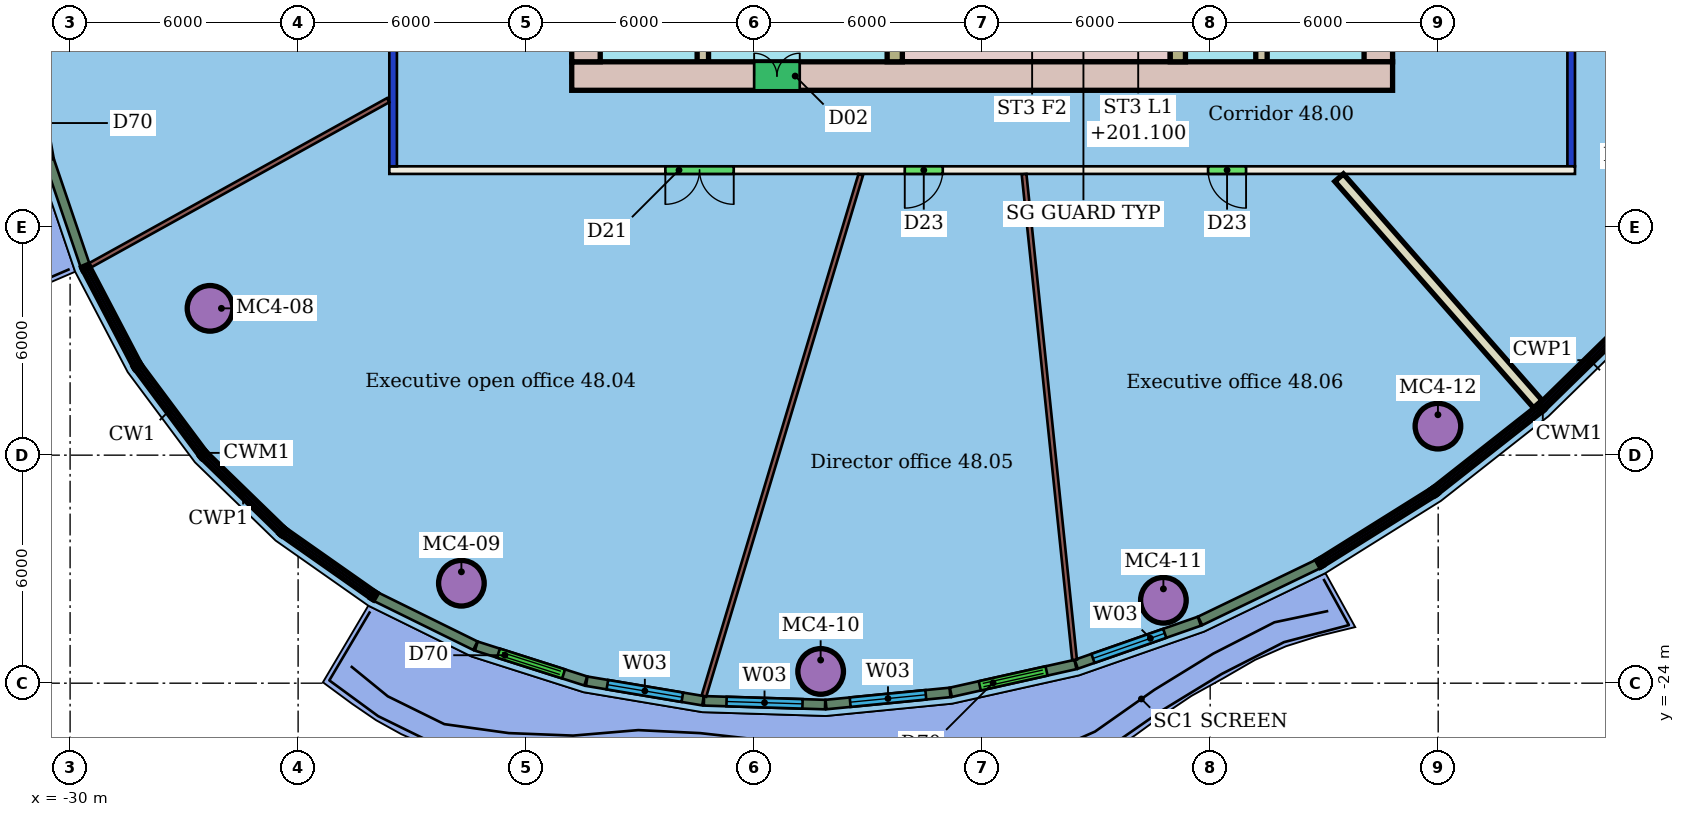
"""IFC4 building model, lengths in metres.
Left out: names, types, materials, properties, quantities, classifications, styles, units other than length and angle.
Written with IfcOpenShell. Run it as: python <this file> out.ifc"""

import sys

from ifc_helpers import new_model, si_unit, direction, frame, frame_2d, origin, origin_2d, place, context, subcontext, project, spatial, rectangle, hollow_circle, extrude, element, fill, save


model = new_model("IFC4")
c1 = context("Model", 3, precision=1e-05, world=origin(), true_north=direction((0.0, 1.0)))
c2 = subcontext(c1, "Body", "Model", "MODEL_VIEW")
j1 = project(units=[si_unit("LENGTHUNIT", "METRE"), si_unit("PLANEANGLEUNIT", "RADIAN")], contexts=[c1])
p1 = place(None, origin())
s1 = spatial("IfcSite", under=j1, at=p1, CompositionType="ELEMENT")
p2 = place(p1, origin())
s2 = spatial("IfcBuilding", under=s1, at=p2, CompositionType="ELEMENT")
p3 = place(p2, frame((0.0, 0.0, 199.3)))
s3 = spatial("IfcBuildingStorey", under=s2, at=p3, CompositionType="ELEMENT", Elevation=199.3)
for number, where, z_axis, x_axis in (
    (1, (-26.318, -14.137, 0.0), (0.0, 0.0, 1.0), (1.0, 0.0, 0.0)),
    (2, (-19.704, -21.37, 0.0), (0.0, 0.0, 1.0), (1.0, 0.0, 0.0)),
    (3, (-10.25, -23.691, 0.0), (0.0, 0.0, 1.0), (1.0, 0.0, 0.0)),
    (4, (-1.231, -21.819, 0.0), (0.0, 0.0, 1.0), (1.0, 0.0, 0.0)),
    (5, (5.993, -17.237, 0.0), (0.0, 0.0, 1.0), (1.0, 0.0, 0.0)),
):
    element("IfcColumn", number, at=place(p3, frame(where, z_axis=z_axis, x_axis=x_axis)), inside=s3, PredefinedType="COLUMN", context=c2, shape_type="SweptSolid", body=[
        extrude(hollow_circle(Radius=0.6, WallThickness=0.045, at=origin_2d()), origin(), (0.0, 0.0, 1.0), 3.45),
    ])
p4 = place(p3, frame((9.6, -10.5, 0.0), z_axis=(0.0, 0.0, 1.0), x_axis=(-1.0, 0.0, 0.0)))
e6 = element("IfcWall", 6, at=p4, inside=s3, PredefinedType="PARTITIONING", context=c2, shape_type="SweptSolid", body=[
    extrude(rectangle(XDim=31.2, YDim=0.2, at=frame_2d((15.6, 0.0))), origin(), (0.0, 0.0, 1.0), 3.45),
])
p5 = place(p4, frame((22.137, 0.0, 0.0)))
e7 = element("IfcOpeningElement", 7, at=p5, cuts=e6, PredefinedType="OPENING", context=c2, shape_type="SweptSolid", body=[
    extrude(rectangle(XDim=1.8, YDim=2.1, at=frame_2d((0.9, 1.05))), frame((0.0, 0.11, 0.0), z_axis=(0.0, -1.0, 0.0), x_axis=(1.0, 0.0, 0.0)), (0.0, 0.0, 1.0), 0.22),
])
p6 = place(p4, frame((16.636, 0.0, 0.0)))
e8 = element("IfcOpeningElement", 8, at=p6, cuts=e6, PredefinedType="OPENING", context=c2, shape_type="SweptSolid", body=[
    extrude(rectangle(XDim=1.0, YDim=2.4, at=frame_2d((0.5, 1.2))), frame((0.0, 0.11, 0.0), z_axis=(0.0, -1.0, 0.0), x_axis=(1.0, 0.0, 0.0)), (0.0, 0.0, 1.0), 0.22),
])
p7 = place(p4, frame((8.655, 0.0, 0.0)))
e9 = element("IfcOpeningElement", 9, at=p7, cuts=e6, PredefinedType="OPENING", context=c2, shape_type="SweptSolid", body=[
    extrude(rectangle(XDim=1.0, YDim=2.4, at=frame_2d((0.5, 1.2))), frame((0.0, 0.11, 0.0), z_axis=(0.0, -1.0, 0.0), x_axis=(1.0, 0.0, 0.0)), (0.0, 0.0, 1.0), 0.22),
])
p8 = place(p3, frame((-21.5, -10.4, 0.0), z_axis=(0.0, 0.0, 1.0), x_axis=(0.0, 1.0, 0.0)))
e10 = element("IfcWall", 10, at=p8, inside=s3, PredefinedType="PARTITIONING", context=c2, shape_type="SweptSolid", body=[
    extrude(rectangle(XDim=20.8, YDim=0.2, at=frame_2d((10.4, 0.0))), origin(), (0.0, 0.0, 1.0), 3.05),
])
p9 = place(p8, frame((10.705, 0.0, 0.0)))
e11 = element("IfcOpeningElement", 11, at=p9, cuts=e10, PredefinedType="OPENING", context=c2, shape_type="SweptSolid", body=[
    extrude(rectangle(XDim=1.8, YDim=2.4, at=frame_2d((0.9, 1.2))), frame((0.0, 0.11, 0.0), z_axis=(0.0, -1.0, 0.0), x_axis=(1.0, 0.0, 0.0)), (0.0, 0.0, 1.0), 0.22),
])
p10 = place(p3, frame((9.5, 10.4, 0.0), z_axis=(0.0, 0.0, 1.0), x_axis=(0.0, -1.0, 0.0)))
e12 = element("IfcWall", 12, at=p10, inside=s3, PredefinedType="PARTITIONING", context=c2, shape_type="SweptSolid", body=[
    extrude(rectangle(XDim=20.8, YDim=0.2, at=frame_2d((10.4, 0.0))), origin(), (0.0, 0.0, 1.0), 3.05),
])
p11 = place(p10, frame((10.084, 0.0, 0.0)))
e13 = element("IfcOpeningElement", 13, at=p11, cuts=e12, PredefinedType="OPENING", context=c2, shape_type="SweptSolid", body=[
    extrude(rectangle(XDim=1.8, YDim=2.4, at=frame_2d((0.9, 1.2))), frame((0.0, 0.11, 0.0), z_axis=(0.0, -1.0, 0.0), x_axis=(1.0, 0.0, 0.0)), (0.0, 0.0, 1.0), 0.22),
])
p12 = place(p3, frame((-29.476, -13.006, 0.0), z_axis=(0.0, 0.0, 1.0), x_axis=(0.874733135583, 0.484604933439, 0.0)))
e14 = element("IfcWall", 14, at=p12, inside=s3, PredefinedType="PARTITIONING", context=c2, shape_type="SweptSolid", body=[
    extrude(rectangle(XDim=8.969, YDim=0.125, at=frame_2d((4.485, 0.0))), origin(), (0.0, 0.0, 1.0), 3.45),
])
p13 = place(p3, frame((-13.321, -24.339, 0.0), z_axis=(0.0, 0.0, 1.0), x_axis=(0.288057495031, 0.957613115802, 0.0)))
e15 = element("IfcWall", 15, at=p13, inside=s3, PredefinedType="PARTITIONING", context=c2, shape_type="SweptSolid", body=[
    extrude(rectangle(XDim=14.329, YDim=0.125, at=frame_2d((7.164, 0.0))), origin(), (0.0, 0.0, 1.0), 3.45),
])
p14 = place(p3, frame((-3.569, -23.386, 0.0), z_axis=(0.0, 0.0, 1.0), x_axis=(-0.103408703267, 0.994638949614, 0.0)))
e16 = element("IfcWall", 16, at=p14, inside=s3, PredefinedType="PARTITIONING", context=c2, shape_type="SweptSolid", body=[
    extrude(rectangle(XDim=12.848, YDim=0.125, at=frame_2d((6.424, 0.0))), origin(), (0.0, 0.0, 1.0), 3.45),
])
p15 = place(p3, frame((8.622, -16.656, 0.0), z_axis=(0.0, 0.0, 1.0), x_axis=(-0.659742211608, 0.751491992121, 0.0)))
e17 = element("IfcWall", 17, at=p15, inside=s3, PredefinedType="PARTITIONING", context=c2, shape_type="SweptSolid", body=[
    extrude(rectangle(XDim=7.927, YDim=0.3, at=frame_2d((3.963, 0.0))), origin(), (0.0, 0.0, 1.0), 3.45),
])
p16 = place(p3, frame((-31.091, -7.243, 0.0), z_axis=(0.0, 0.0, 1.0), x_axis=(0.177755310082, -0.984074717558, 0.0)))
e18 = element("IfcWall", 18, at=p16, inside=s3, PredefinedType="SOLIDWALL", context=c2, shape_type="SweptSolid", body=[
    extrude(rectangle(XDim=3.023, YDim=0.25, at=frame_2d((1.511, 0.0))), origin(), (0.0, 0.0, 1.0), 3.1),
])
p17 = place(p16, frame((0.611, 0.0, 0.0)))
e19 = element("IfcOpeningElement", 19, at=p17, cuts=e18, PredefinedType="OPENING", context=c2, shape_type="SweptSolid", body=[
    extrude(rectangle(XDim=1.8, YDim=2.4, at=frame_2d((0.9, 1.2))), frame((0.0, 0.135, 0.0), z_axis=(0.0, -1.0, 0.0), x_axis=(1.0, 0.0, 0.0)), (0.0, 0.0, 1.0), 0.27),
])
p18 = place(p3, frame((-30.547, -10.243, 0.0), z_axis=(0.0, 0.0, 1.0), x_axis=(0.321901231571, -0.946773255385, 0.0)))
e20 = element("IfcWall", 20, at=p18, inside=s3, PredefinedType="SOLIDWALL", context=c2, shape_type="SweptSolid", body=[
    extrude(rectangle(XDim=2.915, YDim=0.25, at=frame_2d((1.457, 0.0))), origin(), (0.0, 0.0, 1.0), 3.1),
])
p19 = place(p3, frame((-21.951, -21.726, 0.0), z_axis=(0.0, 0.0, 1.0), x_axis=(0.897141057634, -0.441744182426, 0.0)))
e21 = element("IfcWall", 21, at=p19, inside=s3, PredefinedType="SOLIDWALL", context=c2, shape_type="SweptSolid", body=[
    extrude(rectangle(XDim=2.915, YDim=0.25, at=frame_2d((1.458, 0.0))), origin(), (0.0, 0.0, 1.0), 3.1),
])
p20 = place(p3, frame((-19.311, -23.024, 0.0), z_axis=(0.0, 0.0, 1.0), x_axis=(0.952776106235, -0.303673659358, 0.0)))
e22 = element("IfcWall", 22, at=p20, inside=s3, PredefinedType="SOLIDWALL", context=c2, shape_type="SweptSolid", body=[
    extrude(rectangle(XDim=3.023, YDim=0.25, at=frame_2d((1.511, 0.0))), origin(), (0.0, 0.0, 1.0), 3.1),
])
p21 = place(p20, frame((0.611, 0.0, 0.0)))
e23 = element("IfcOpeningElement", 23, at=p21, cuts=e22, PredefinedType="OPENING", context=c2, shape_type="SweptSolid", body=[
    extrude(rectangle(XDim=1.8, YDim=2.4, at=frame_2d((0.9, 1.2))), frame((0.0, 0.135, 0.0), z_axis=(0.0, -1.0, 0.0), x_axis=(1.0, 0.0, 0.0)), (0.0, 0.0, 1.0), 0.27),
])
p22 = place(p3, frame((-16.406, -23.948, 0.0), z_axis=(0.0, 0.0, 1.0), x_axis=(0.986216863641, -0.165457843178, 0.0)))
e24 = element("IfcWall", 24, at=p22, inside=s3, PredefinedType="SOLIDWALL", context=c2, shape_type="SweptSolid", body=[
    extrude(rectangle(XDim=3.103, YDim=0.25, at=frame_2d((1.552, 0.0))), origin(), (0.0, 0.0, 1.0), 3.1),
])
p23 = place(p22, frame((0.552, 0.0, 0.9)))
e25 = element("IfcOpeningElement", 25, at=p23, cuts=e24, PredefinedType="OPENING", context=c2, shape_type="SweptSolid", body=[
    extrude(rectangle(XDim=2.0, YDim=2.1, at=frame_2d((1.0, 1.05))), frame((0.0, 0.135, 0.0), z_axis=(0.0, -1.0, 0.0), x_axis=(1.0, 0.0, 0.0)), (0.0, 0.0, 1.0), 0.27),
])
p24 = place(p3, frame((-13.321, -24.464, 0.0), z_axis=(0.0, 0.0, 1.0), x_axis=(0.999517066274, -0.031074655709, 0.0)))
e26 = element("IfcWall", 26, at=p24, inside=s3, PredefinedType="SOLIDWALL", context=c2, shape_type="SweptSolid", body=[
    extrude(rectangle(XDim=3.19, YDim=0.25, at=frame_2d((1.595, 0.0))), origin(), (0.0, 0.0, 1.0), 3.1),
])
p25 = place(p24, frame((0.595, 0.0, 0.9)))
e27 = element("IfcOpeningElement", 27, at=p25, cuts=e26, PredefinedType="OPENING", context=c2, shape_type="SweptSolid", body=[
    extrude(rectangle(XDim=2.0, YDim=2.1, at=frame_2d((1.0, 1.05))), frame((0.0, 0.135, 0.0), z_axis=(0.0, -1.0, 0.0), x_axis=(1.0, 0.0, 0.0)), (0.0, 0.0, 1.0), 0.27),
])
p26 = place(p3, frame((-10.109, -24.562, 0.0), z_axis=(0.0, 0.0, 1.0), x_axis=(0.995263213441, 0.097216953109, 0.0)))
e28 = element("IfcWall", 28, at=p26, inside=s3, PredefinedType="SOLIDWALL", context=c2, shape_type="SweptSolid", body=[
    extrude(rectangle(XDim=3.277, YDim=0.25, at=frame_2d((1.639, 0.0))), origin(), (0.0, 0.0, 1.0), 3.1),
])
p27 = place(p26, frame((0.639, 0.0, 0.9)))
e29 = element("IfcOpeningElement", 29, at=p27, cuts=e28, PredefinedType="OPENING", context=c2, shape_type="SweptSolid", body=[
    extrude(rectangle(XDim=2.0, YDim=2.1, at=frame_2d((1.0, 1.05))), frame((0.0, 0.135, 0.0), z_axis=(0.0, -1.0, 0.0), x_axis=(1.0, 0.0, 0.0)), (0.0, 0.0, 1.0), 0.27),
])
p28 = place(p3, frame((-6.824, -24.24, 0.0), z_axis=(0.0, 0.0, 1.0), x_axis=(0.976008895139, 0.217730651514, 0.0)))
e30 = element("IfcWall", 30, at=p28, inside=s3, PredefinedType="SOLIDWALL", context=c2, shape_type="SweptSolid", body=[
    extrude(rectangle(XDim=3.359, YDim=0.25, at=frame_2d((1.68, 0.0))), origin(), (0.0, 0.0, 1.0), 3.1),
])
p29 = place(p28, frame((0.78, 0.0, 0.0)))
e31 = element("IfcOpeningElement", 31, at=p29, cuts=e30, PredefinedType="OPENING", context=c2, shape_type="SweptSolid", body=[
    extrude(rectangle(XDim=1.8, YDim=2.4, at=frame_2d((0.9, 1.2))), frame((0.0, 0.135, 0.0), z_axis=(0.0, -1.0, 0.0), x_axis=(1.0, 0.0, 0.0)), (0.0, 0.0, 1.0), 0.27),
])
p30 = place(p3, frame((-3.523, -23.502, 0.0), z_axis=(0.0, 0.0, 1.0), x_axis=(0.943927112693, 0.330153912475, 0.0)))
e32 = element("IfcWall", 32, at=p30, inside=s3, PredefinedType="SOLIDWALL", context=c2, shape_type="SweptSolid", body=[
    extrude(rectangle(XDim=3.431, YDim=0.25, at=frame_2d((1.716, 0.0))), origin(), (0.0, 0.0, 1.0), 3.1),
])
p31 = place(p30, frame((0.466, 0.0, 0.9)))
e33 = element("IfcOpeningElement", 33, at=p31, cuts=e32, PredefinedType="OPENING", context=c2, shape_type="SweptSolid", body=[
    extrude(rectangle(XDim=2.0, YDim=2.1, at=frame_2d((1.0, 1.05))), frame((0.0, 0.135, 0.0), z_axis=(0.0, -1.0, 0.0), x_axis=(1.0, 0.0, 0.0)), (0.0, 0.0, 1.0), 0.27),
])
p32 = place(p3, frame((-0.264, -22.361, 0.0), z_axis=(0.0, 0.0, 1.0), x_axis=(0.900825117277, 0.43418211396, 0.0)))
e34 = element("IfcWall", 34, at=p32, inside=s3, PredefinedType="SOLIDWALL", context=c2, shape_type="SweptSolid", body=[
    extrude(rectangle(XDim=3.445, YDim=0.25, at=frame_2d((1.722, 0.0))), origin(), (0.0, 0.0, 1.0), 3.1),
])
p33 = place(p3, frame((-16.8, -8.025, 0.0), z_axis=(0.0, 0.0, 1.0), x_axis=(1.0, 0.0, 0.0)))
e35 = element("IfcWall", 35, at=p33, inside=s3, PredefinedType="SHEAR", context=c2, shape_type="SweptSolid", body=[
    extrude(rectangle(XDim=21.6, YDim=0.75, at=frame_2d((10.8, 0.0))), origin(), (0.0, 0.0, 1.0), 3.3),
])
p34 = place(p33, frame((4.8, 0.0, 0.0)))
e36 = element("IfcOpeningElement", 36, at=p34, cuts=e35, PredefinedType="OPENING", context=c2, shape_type="SweptSolid", body=[
    extrude(rectangle(XDim=1.2, YDim=2.1, at=frame_2d((0.6, 1.05))), frame((0.0, 0.385, 0.0), z_axis=(0.0, -1.0, 0.0), x_axis=(1.0, 0.0, 0.0)), (0.0, 0.0, 1.0), 0.77),
])
p35 = place(p3, frame((-16.425, 7.65, 0.0), z_axis=(0.0, 0.0, 1.0), x_axis=(0.0, -1.0, 0.0)))
e37 = element("IfcWall", 37, at=p35, inside=s3, PredefinedType="SHEAR", context=c2, shape_type="SweptSolid", body=[
    extrude(rectangle(XDim=15.3, YDim=0.75, at=frame_2d((7.65, 0.0))), origin(), (0.0, 0.0, 1.0), 3.3),
])
p36 = place(p35, frame((11.25, 0.0, 0.0)))
e38 = element("IfcOpeningElement", 38, at=p36, cuts=e37, PredefinedType="OPENING", context=c2, shape_type="SweptSolid", body=[
    extrude(rectangle(XDim=1.2, YDim=2.1, at=frame_2d((0.6, 1.05))), frame((0.0, 0.385, 0.0), z_axis=(0.0, -1.0, 0.0), x_axis=(1.0, 0.0, 0.0)), (0.0, 0.0, 1.0), 0.77),
])
p37 = place(p35, frame((2.85, 0.0, 0.0)))
e39 = element("IfcOpeningElement", 39, at=p37, cuts=e37, PredefinedType="OPENING", context=c2, shape_type="SweptSolid", body=[
    extrude(rectangle(XDim=1.2, YDim=2.1, at=frame_2d((0.6, 1.05))), frame((0.0, 0.385, 0.0), z_axis=(0.0, -1.0, 0.0), x_axis=(1.0, 0.0, 0.0)), (0.0, 0.0, 1.0), 0.77),
])
p38 = place(p3, frame((4.425, -7.65, 0.0), z_axis=(0.0, 0.0, 1.0), x_axis=(0.0, 1.0, 0.0)))
e40 = element("IfcWall", 40, at=p38, inside=s3, PredefinedType="SHEAR", context=c2, shape_type="SweptSolid", body=[
    extrude(rectangle(XDim=15.3, YDim=0.75, at=frame_2d((7.65, 0.0))), origin(), (0.0, 0.0, 1.0), 3.3),
])
p39 = place(p38, frame((2.85, 0.0, 0.0)))
e41 = element("IfcOpeningElement", 41, at=p39, cuts=e40, PredefinedType="OPENING", context=c2, shape_type="SweptSolid", body=[
    extrude(rectangle(XDim=1.2, YDim=2.1, at=frame_2d((0.6, 1.05))), frame((0.0, 0.385, 0.0), z_axis=(0.0, -1.0, 0.0), x_axis=(1.0, 0.0, 0.0)), (0.0, 0.0, 1.0), 0.77),
])
p40 = place(p38, frame((11.25, 0.0, 0.0)))
e42 = element("IfcOpeningElement", 42, at=p40, cuts=e40, PredefinedType="OPENING", context=c2, shape_type="SweptSolid", body=[
    extrude(rectangle(XDim=1.2, YDim=2.1, at=frame_2d((0.6, 1.05))), frame((0.0, 0.385, 0.0), z_axis=(0.0, -1.0, 0.0), x_axis=(1.0, 0.0, 0.0)), (0.0, 0.0, 1.0), 0.77),
])
p41 = place(p3, frame((-13.35, 7.65, 0.0), z_axis=(0.0, 0.0, 1.0), x_axis=(0.0, -1.0, 0.0)))
e43 = element("IfcWall", 43, at=p41, inside=s3, PredefinedType="SHEAR", context=c2, shape_type="SweptSolid", body=[
    extrude(rectangle(XDim=15.3, YDim=0.3, at=frame_2d((7.65, 0.0))), origin(), (0.0, 0.0, 1.0), 3.3),
])
p42 = place(p41, frame((6.9, 0.0, 0.0)))
e44 = element("IfcOpeningElement", 44, at=p42, cuts=e43, PredefinedType="OPENING", context=c2, shape_type="SweptSolid", body=[
    extrude(rectangle(XDim=1.5, YDim=2.1, at=frame_2d((0.75, 1.05))), frame((0.0, 0.16, 0.0), z_axis=(0.0, -1.0, 0.0), x_axis=(1.0, 0.0, 0.0)), (0.0, 0.0, 1.0), 0.32),
])
p43 = place(p3, frame((1.35, -7.65, 0.0), z_axis=(0.0, 0.0, 1.0), x_axis=(0.0, 1.0, 0.0)))
e45 = element("IfcWall", 45, at=p43, inside=s3, PredefinedType="SHEAR", context=c2, shape_type="SweptSolid", body=[
    extrude(rectangle(XDim=15.3, YDim=0.3, at=frame_2d((7.65, 0.0))), origin(), (0.0, 0.0, 1.0), 3.3),
])
p44 = place(p43, frame((1.56, 0.0, 0.0)))
e46 = element("IfcOpeningElement", 46, at=p44, cuts=e45, PredefinedType="OPENING", context=c2, shape_type="SweptSolid", body=[
    extrude(rectangle(XDim=1.0, YDim=2.1, at=frame_2d((0.5, 1.05))), frame((0.0, 0.16, 0.0), z_axis=(0.0, -1.0, 0.0), x_axis=(1.0, 0.0, 0.0)), (0.0, 0.0, 1.0), 0.32),
])
p45 = place(p43, frame((6.9, 0.0, 0.0)))
e47 = element("IfcOpeningElement", 47, at=p45, cuts=e45, PredefinedType="OPENING", context=c2, shape_type="SweptSolid", body=[
    extrude(rectangle(XDim=1.5, YDim=2.1, at=frame_2d((0.75, 1.05))), frame((0.0, 0.16, 0.0), z_axis=(0.0, -1.0, 0.0), x_axis=(1.0, 0.0, 0.0)), (0.0, 0.0, 1.0), 0.32),
])
p46 = place(p3, frame((-8.3, -3.88, 0.0), z_axis=(0.0, 0.0, 1.0), x_axis=(0.0, -1.0, 0.0)))
e48 = element("IfcWall", 48, at=p46, inside=s3, PredefinedType="SHEAR", context=c2, shape_type="SweptSolid", body=[
    extrude(rectangle(XDim=3.77, YDim=0.4, at=frame_2d((1.885, 0.0))), origin(), (0.0, 0.0, 1.0), 3.3),
])
p47 = place(p46, frame((1.11, 0.0, 0.0)))
e49 = element("IfcOpeningElement", 49, at=p47, cuts=e48, PredefinedType="OPENING", context=c2, shape_type="SweptSolid", body=[
    extrude(rectangle(XDim=1.2, YDim=2.1, at=frame_2d((0.6, 1.05))), frame((0.0, 0.21, 0.0), z_axis=(0.0, -1.0, 0.0), x_axis=(1.0, 0.0, 0.0)), (0.0, 0.0, 1.0), 0.42),
])
p48 = place(p3, frame((-0.85, -3.88, 0.0), z_axis=(0.0, 0.0, 1.0), x_axis=(0.0, -1.0, 0.0)))
e50 = element("IfcWall", 50, at=p48, inside=s3, PredefinedType="SHEAR", context=c2, shape_type="SweptSolid", body=[
    extrude(rectangle(XDim=3.77, YDim=0.4, at=frame_2d((1.885, 0.0))), origin(), (0.0, 0.0, 1.0), 3.3),
])
p49 = place(p3, frame((-8.1, -7.475, 0.0), z_axis=(0.0, 0.0, 1.0), x_axis=(1.0, 0.0, 0.0)))
e51 = element("IfcWall", 51, at=p49, inside=s3, PredefinedType="SHEAR", context=c2, shape_type="SweptSolid", body=[
    extrude(rectangle(XDim=7.05, YDim=0.35, at=frame_2d((3.525, 0.0))), origin(), (0.0, 0.0, 1.0), 3.3),
])
p50 = place(p5, origin())
e52 = element("IfcDoor", 52, at=p50, inside=s3, OperationType="DOUBLE_DOOR_SINGLE_SWING", PredefinedType="DOOR", context=c2, shape_type="SweptSolid", body=[
    extrude(rectangle(XDim=1.8, YDim=2.1, at=frame_2d((0.9, 1.05))), frame((0.0, 0.025, 0.0), z_axis=(0.0, -1.0, 0.0), x_axis=(1.0, 0.0, 0.0)), (0.0, 0.0, 1.0), 0.05),
])
fill(e7, e52)
p51 = place(p6, origin())
e53 = element("IfcDoor", 53, at=p51, inside=s3, OperationType="SINGLE_SWING_RIGHT", PredefinedType="DOOR", context=c2, shape_type="SweptSolid", body=[
    extrude(rectangle(XDim=1.0, YDim=2.4, at=frame_2d((0.5, 1.2))), frame((0.0, 0.025, 0.0), z_axis=(0.0, -1.0, 0.0), x_axis=(1.0, 0.0, 0.0)), (0.0, 0.0, 1.0), 0.05),
])
fill(e8, e53)
p52 = place(p7, origin())
e54 = element("IfcDoor", 54, at=p52, inside=s3, OperationType="SINGLE_SWING_LEFT", PredefinedType="DOOR", context=c2, shape_type="SweptSolid", body=[
    extrude(rectangle(XDim=1.0, YDim=2.4, at=frame_2d((0.5, 1.2))), frame((0.0, 0.025, 0.0), z_axis=(0.0, -1.0, 0.0), x_axis=(1.0, 0.0, 0.0)), (0.0, 0.0, 1.0), 0.05),
])
fill(e9, e54)
p53 = place(p21, origin())
e55 = element("IfcDoor", 55, at=p53, inside=s3, OperationType="DOUBLE_DOOR_SLIDING", PredefinedType="DOOR", context=c2, shape_type="SweptSolid", body=[
    extrude(rectangle(XDim=1.8, YDim=2.4, at=frame_2d((0.9, 1.2))), frame((0.0, 0.025, 0.0), z_axis=(0.0, -1.0, 0.0), x_axis=(1.0, 0.0, 0.0)), (0.0, 0.0, 1.0), 0.05),
])
fill(e23, e55)
p54 = place(p23, origin())
e56 = element("IfcWindow", 56, at=p54, inside=s3, PartitioningType="SINGLE_PANEL", PredefinedType="WINDOW", context=c2, shape_type="SweptSolid", body=[
    extrude(rectangle(XDim=2.0, YDim=2.1, at=frame_2d((1.0, 1.05))), frame((0.0, 0.03, 0.0), z_axis=(0.0, -1.0, 0.0), x_axis=(1.0, 0.0, 0.0)), (0.0, 0.0, 1.0), 0.06),
])
fill(e25, e56)
p55 = place(p25, origin())
e57 = element("IfcWindow", 57, at=p55, inside=s3, PartitioningType="SINGLE_PANEL", PredefinedType="WINDOW", context=c2, shape_type="SweptSolid", body=[
    extrude(rectangle(XDim=2.0, YDim=2.1, at=frame_2d((1.0, 1.05))), frame((0.0, 0.03, 0.0), z_axis=(0.0, -1.0, 0.0), x_axis=(1.0, 0.0, 0.0)), (0.0, 0.0, 1.0), 0.06),
])
fill(e27, e57)
p56 = place(p27, origin())
e58 = element("IfcWindow", 58, at=p56, inside=s3, PartitioningType="SINGLE_PANEL", PredefinedType="WINDOW", context=c2, shape_type="SweptSolid", body=[
    extrude(rectangle(XDim=2.0, YDim=2.1, at=frame_2d((1.0, 1.05))), frame((0.0, 0.03, 0.0), z_axis=(0.0, -1.0, 0.0), x_axis=(1.0, 0.0, 0.0)), (0.0, 0.0, 1.0), 0.06),
])
fill(e29, e58)
p57 = place(p29, origin())
e59 = element("IfcDoor", 59, at=p57, inside=s3, OperationType="DOUBLE_DOOR_SLIDING", PredefinedType="DOOR", context=c2, shape_type="SweptSolid", body=[
    extrude(rectangle(XDim=1.8, YDim=2.4, at=frame_2d((0.9, 1.2))), frame((0.0, 0.025, 0.0), z_axis=(0.0, -1.0, 0.0), x_axis=(1.0, 0.0, 0.0)), (0.0, 0.0, 1.0), 0.05),
])
fill(e31, e59)
p58 = place(p31, origin())
e60 = element("IfcWindow", 60, at=p58, inside=s3, PartitioningType="SINGLE_PANEL", PredefinedType="WINDOW", context=c2, shape_type="SweptSolid", body=[
    extrude(rectangle(XDim=2.0, YDim=2.1, at=frame_2d((1.0, 1.05))), frame((0.0, 0.03, 0.0), z_axis=(0.0, -1.0, 0.0), x_axis=(1.0, 0.0, 0.0)), (0.0, 0.0, 1.0), 0.06),
])
fill(e33, e60)
p59 = place(p34, origin())
e61 = element("IfcDoor", 61, at=p59, inside=s3, OperationType="DOUBLE_DOOR_SINGLE_SWING", PredefinedType="NOTDEFINED", context=c2, shape_type="SweptSolid", body=[
    extrude(rectangle(XDim=1.2, YDim=2.1, at=frame_2d((0.6, 1.05))), frame((0.0, 0.025, 0.0), z_axis=(0.0, -1.0, 0.0), x_axis=(1.0, 0.0, 0.0)), (0.0, 0.0, 1.0), 0.05),
])
fill(e36, e61)
save(model, sys.argv[1])
